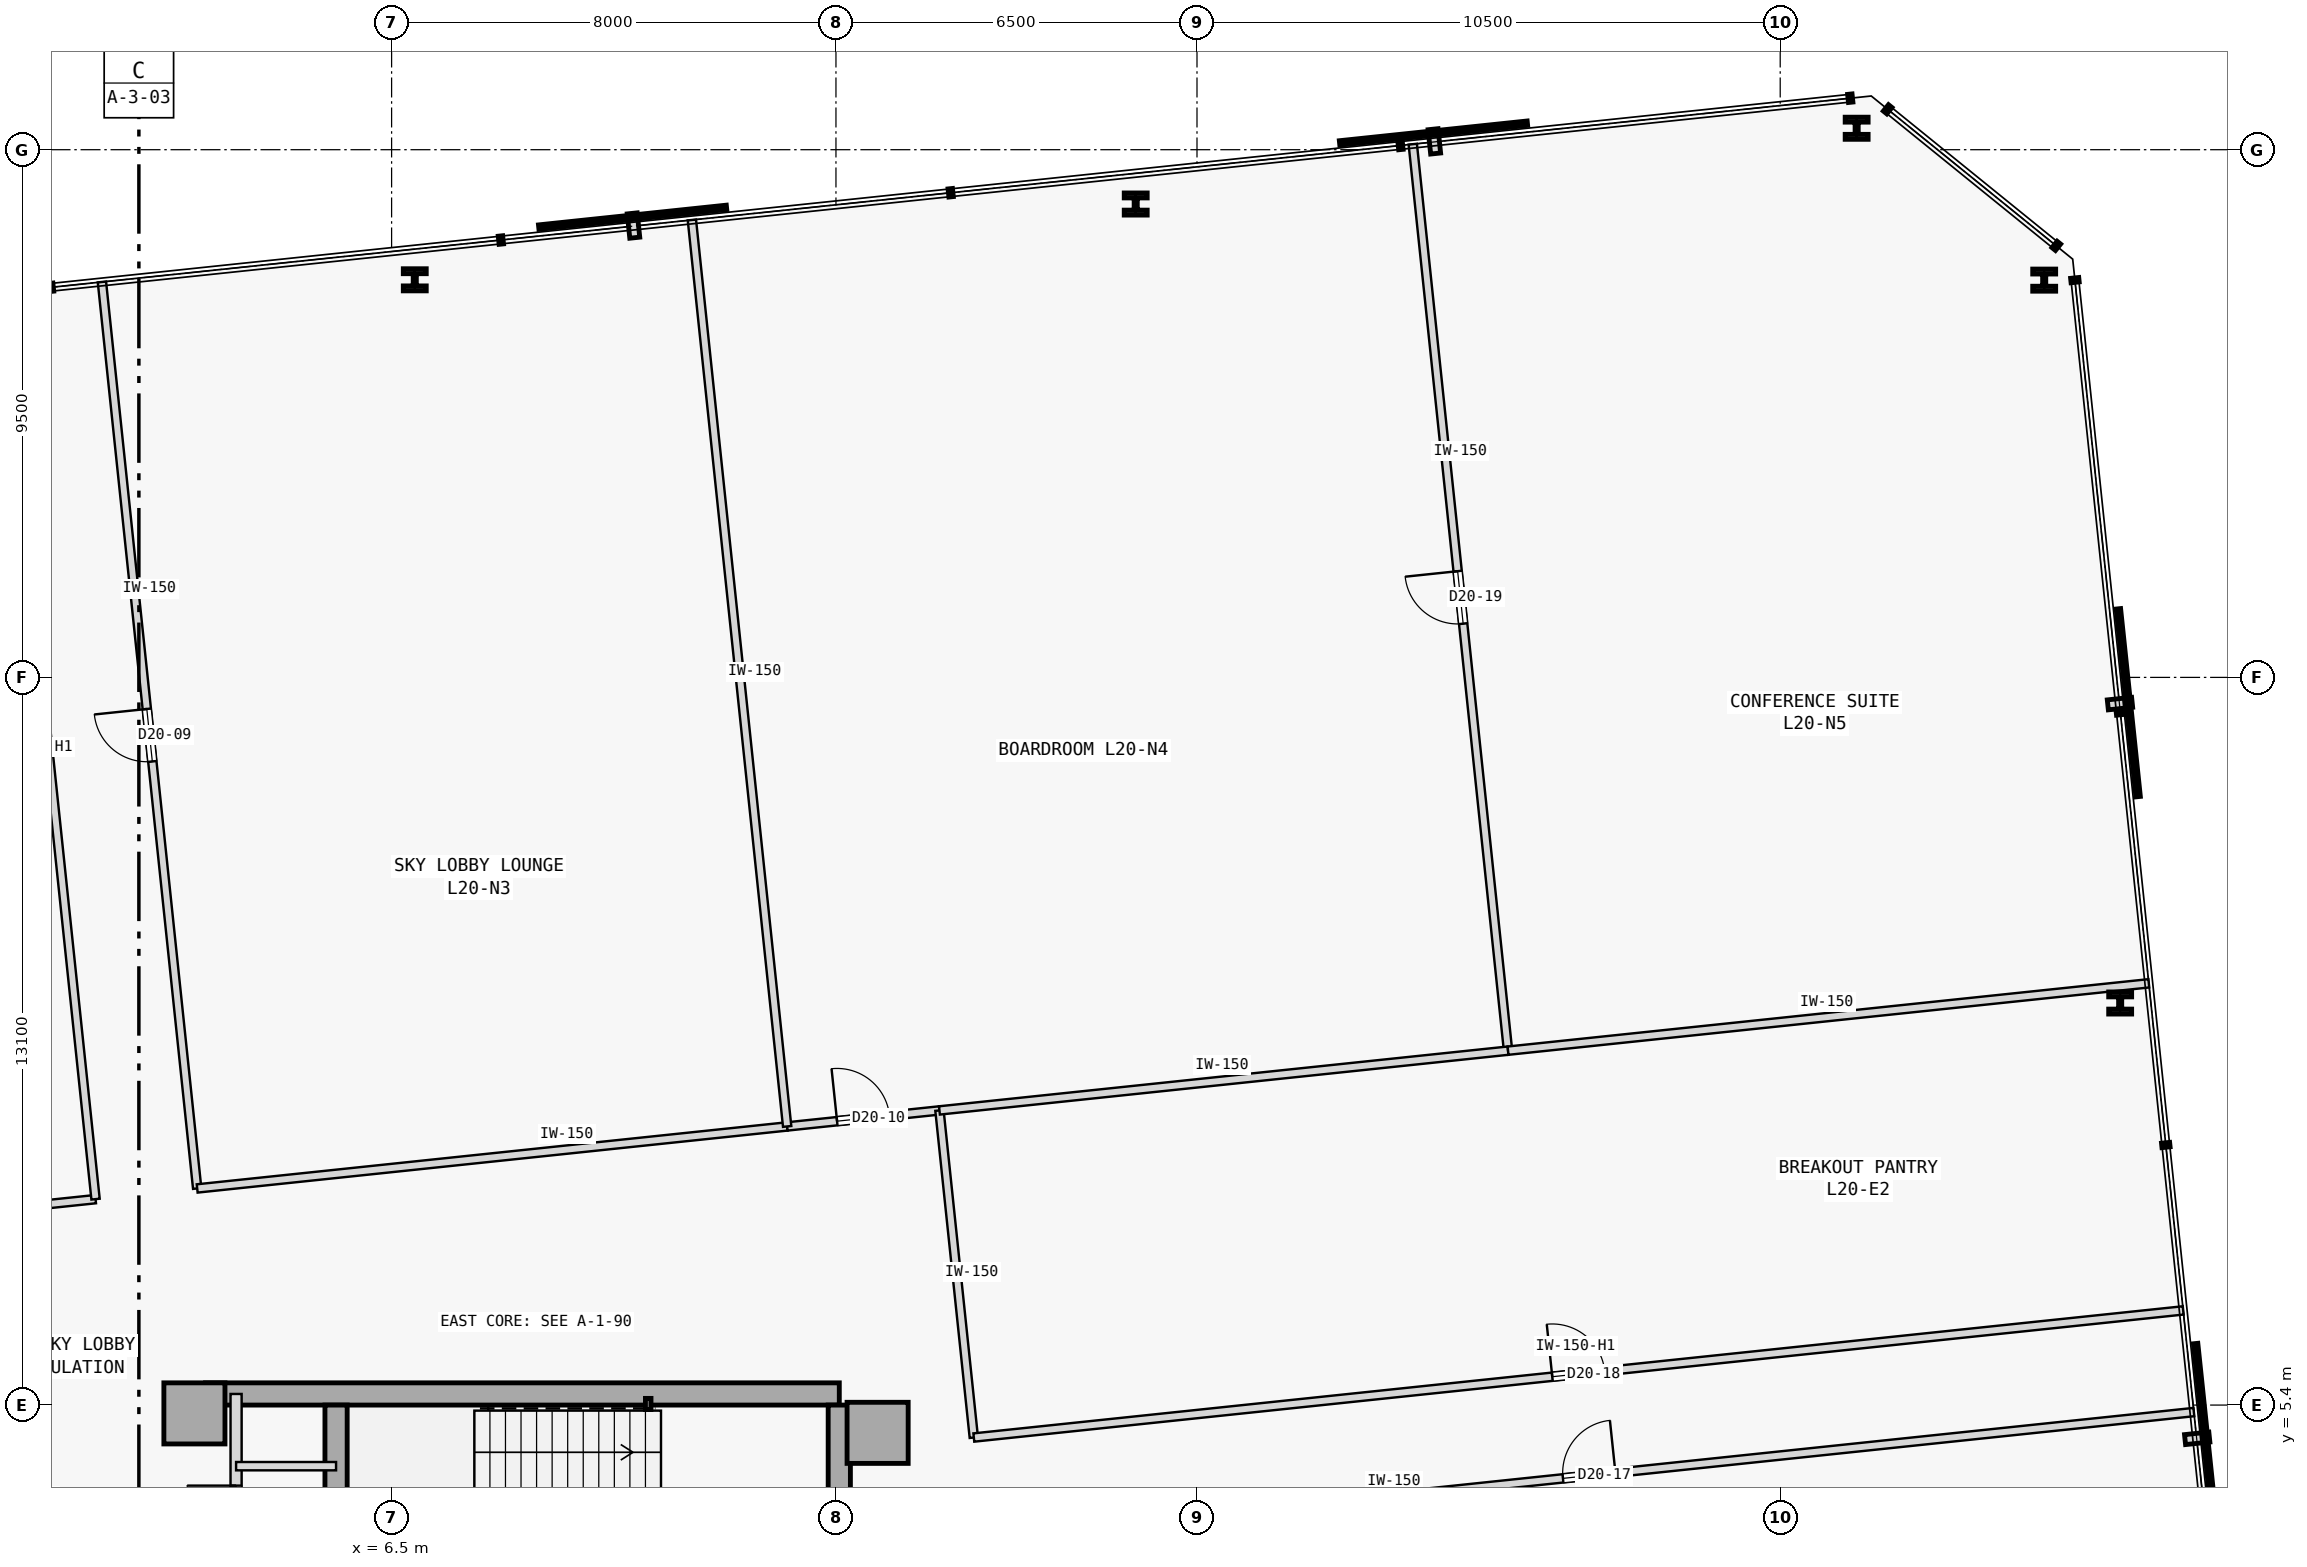
"""IFC4 building model, lengths in metres.
Left out: names, types, materials, properties, quantities, classifications, styles, units other than length and angle.
Written with IfcOpenShell. Run it as: python <this file> out.ifc"""

import sys

from ifc_helpers import new_model, si_unit, direction, frame, frame_2d, origin, origin_2d, place, context, subcontext, project, spatial, rectangle, hollow_rectangle, i_section, extrude, element, fill, save


model = new_model("IFC4")
c1 = context("Model", 3, precision=1e-05, world=origin(), true_north=direction((0.0, 1.0)))
c2 = subcontext(c1, "Body", "Model", "MODEL_VIEW")
j1 = project(units=[si_unit("LENGTHUNIT", "METRE"), si_unit("PLANEANGLEUNIT", "RADIAN")], contexts=[c1])
p1 = place(None, origin())
s1 = spatial("IfcSite", under=j1, at=p1, CompositionType="ELEMENT")
p2 = place(p1, origin())
s2 = spatial("IfcBuilding", under=s1, at=p2, CompositionType="ELEMENT")
p3 = place(p2, frame((0.0, 0.0, 83.2)))
s3 = spatial("IfcBuildingStorey", under=s2, at=p3, CompositionType="ELEMENT", Elevation=83.2)
for number, where, z_axis, x_axis in (
    (1, (15.25, 4.9, 0.0), (0.0, 0.0, 1.0), (1.0, 0.0, 0.0)),
    (2, (2.95, 5.25, 0.0), (0.0, 0.0, 1.0), (1.0, 0.0, 0.0)),
):
    element("IfcColumn", number, at=place(p3, frame(where, z_axis=z_axis, x_axis=x_axis)), inside=s3, PredefinedType="COLUMN", context=c2, shape_type="SweptSolid", body=[
        extrude(rectangle(XDim=1.1, YDim=1.1, at=origin_2d()), origin(), (0.0, 0.0, 1.0), 4.2),
    ])
p4 = place(p3, frame((3.15, 5.6, 0.0), z_axis=(0.0, 0.0, 1.0), x_axis=(1.0, 0.0, 0.0)))
e3 = element("IfcWall", 3, at=p4, inside=s3, PredefinedType="SHEAR", context=c2, shape_type="SweptSolid", body=[
    extrude(rectangle(XDim=11.41, YDim=0.4, at=frame_2d((5.705, 0.0))), origin(), (0.0, 0.0, 1.0), 3.975),
])
p5 = place(p3, frame((14.56, -5.4, 0.0), z_axis=(0.0, 0.0, 1.0), x_axis=(0.0, 1.0, 0.0)))
e4 = element("IfcWall", 4, at=p5, inside=s3, PredefinedType="SHEAR", context=c2, shape_type="SweptSolid", body=[
    extrude(rectangle(XDim=10.8, YDim=0.4, at=frame_2d((5.4, 0.0))), origin(), (0.0, 0.0, 1.0), 3.975),
])
p6 = place(p3, frame((5.5, 2.15, 0.0), z_axis=(0.0, 0.0, 1.0), x_axis=(0.0, 1.0, 0.0)))
e5 = element("IfcWall", 5, at=p6, inside=s3, PredefinedType="SHEAR", context=c2, shape_type="SweptSolid", body=[
    extrude(rectangle(XDim=3.25, YDim=0.4, at=frame_2d((1.625, 0.0))), origin(), (0.0, 0.0, 1.0), 3.975),
])
p7 = place(p3, frame((11.12, 5.42, 0.0), z_axis=(0.0, 0.0, 1.0), x_axis=(1.0, 0.0, 0.0)))
e6 = element("IfcColumn", 6, at=p7, inside=s3, PredefinedType="COLUMN", context=c2, shape_type="SweptSolid", body=[
    extrude(hollow_rectangle(XDim=0.1, YDim=0.2, WallThickness=0.008, at=origin_2d()), origin(), (0.0, 0.0, 1.0), 4.2),
])
for number, where, z_axis, x_axis in (
    (7, (37.621, 12.638, 0.0), (0.0, 0.0, 1.0), (1.0, 0.0, 0.0)),
    (8, (36.253, 25.652, 0.0), (0.0, 0.0, 1.0), (1.0, 0.0, 0.0)),
    (9, (32.876, 28.386, 0.0), (0.0, 0.0, 1.0), (1.0, 0.0, 0.0)),
    (10, (19.897, 27.022, 0.0), (0.0, 0.0, 1.0), (1.0, 0.0, 0.0)),
    (11, (6.917, 25.658, 0.0), (0.0, 0.0, 1.0), (1.0, 0.0, 0.0)),
):
    element("IfcColumn", number, at=place(p3, frame(where, z_axis=z_axis, x_axis=x_axis)), inside=s3, PredefinedType="COLUMN", context=c2, shape_type="SweptSolid", body=[
        extrude(i_section(OverallWidth=0.413, OverallDepth=0.398, WebThickness=0.056, FlangeThickness=0.089, FilletRadius=0.015, at=origin_2d()), origin(), (0.0, 0.0, 1.0), 4.2),
    ])
p8 = place(p3, frame((3.7, -1.15, 0.0), z_axis=(0.0, 0.0, 1.0), x_axis=(0.0, 1.0, 0.0)))
e12 = element("IfcWall", 12, at=p8, inside=s3, PredefinedType="STANDARD", context=c2, shape_type="SweptSolid", body=[
    extrude(rectangle(XDim=6.75, YDim=0.2, at=frame_2d((3.375, 0.0))), origin(), (0.0, 0.0, 1.0), 3.975),
])
p9 = place(p8, frame((0.35, 0.0, 0.0)))
e13 = element("IfcOpeningElement", 13, at=p9, cuts=e12, PredefinedType="OPENING", context=c2, shape_type="SweptSolid", body=[
    extrude(rectangle(XDim=0.88, YDim=2.15, at=frame_2d((0.44, 1.075))), frame((0.0, 0.11, 0.0), z_axis=(0.0, -1.0, 0.0), x_axis=(1.0, 0.0, 0.0)), (0.0, 0.0, 1.0), 0.22),
])
p10 = place(p8, frame((2.55, 0.0, 0.0)))
e14 = element("IfcOpeningElement", 14, at=p10, cuts=e12, PredefinedType="OPENING", context=c2, shape_type="SweptSolid", body=[
    extrude(rectangle(XDim=0.92, YDim=2.15, at=frame_2d((0.46, 1.075))), frame((0.0, 0.11, 0.0), z_axis=(0.0, -1.0, 0.0), x_axis=(1.0, 0.0, 0.0)), (0.0, 0.0, 1.0), 0.22),
])
p11 = place(p8, frame((4.22, 0.0, 0.0)))
e15 = element("IfcOpeningElement", 15, at=p11, cuts=e12, PredefinedType="OPENING", context=c2, shape_type="SweptSolid", body=[
    extrude(rectangle(XDim=0.88, YDim=2.15, at=frame_2d((0.44, 1.075))), frame((0.0, 0.11, 0.0), z_axis=(0.0, -1.0, 0.0), x_axis=(1.0, 0.0, 0.0)), (0.0, 0.0, 1.0), 0.22),
])
p12 = place(p3, frame((3.7, 4.3, 0.0), z_axis=(0.0, 0.0, 1.0), x_axis=(1.0, 0.0, 0.0)))
e16 = element("IfcWall", 16, at=p12, inside=s3, PredefinedType="PARTITIONING", context=c2, shape_type="SweptSolid", body=[
    extrude(rectangle(XDim=1.8, YDim=0.15, at=frame_2d((0.9, 0.0))), origin(), (0.0, 0.0, 1.0), 3.975),
])
p13 = place(p3, frame((-16.662, 7.233, 0.0), z_axis=(0.0, 0.0, 1.0), x_axis=(0.994521482375, 0.10453239256, 0.0)))
e17 = element("IfcWall", 17, at=p13, inside=s3, PredefinedType="PARTITIONING", context=c2, shape_type="SweptSolid", body=[
    extrude(rectangle(XDim=17.93, YDim=0.15, at=frame_2d((8.965, 0.0))), origin(), (0.0, 0.0, 1.0), 3.975),
])
p14 = place(p13, frame((8.49, 0.0, 0.0)))
e18 = element("IfcOpeningElement", 18, at=p14, cuts=e17, PredefinedType="OPENING", context=c2, shape_type="SweptSolid", body=[
    extrude(rectangle(XDim=0.95, YDim=2.15, at=frame_2d((0.475, 1.075))), frame((0.0, 0.085, 0.0), z_axis=(0.0, -1.0, 0.0), x_axis=(1.0, 0.0, 0.0)), (0.0, 0.0, 1.0), 0.17),
])
p15 = place(p3, frame((1.17, 9.107, 0.0), z_axis=(0.0, 0.0, 1.0), x_axis=(-0.104521364336, 0.99452264147, 0.0)))
e19 = element("IfcWall", 19, at=p15, inside=s3, PredefinedType="PARTITIONING", context=c2, shape_type="SweptSolid", body=[
    extrude(rectangle(XDim=16.409, YDim=0.15, at=frame_2d((8.205, 0.0))), origin(), (0.0, 0.0, 1.0), 3.525),
])
p16 = place(p3, frame((3.0, 9.3, 0.0), z_axis=(0.0, 0.0, 1.0), x_axis=(-0.104536080245, 0.994521094762, 0.0)))
e20 = element("IfcWall", 20, at=p16, inside=s3, PredefinedType="PARTITIONING", context=c2, shape_type="SweptSolid", body=[
    extrude(rectangle(XDim=16.409, YDim=0.15, at=frame_2d((8.205, 0.0))), origin(), (0.0, 0.0, 1.0), 3.975),
])
p17 = place(p16, frame((7.729, 0.0, 0.0)))
e21 = element("IfcOpeningElement", 21, at=p17, cuts=e20, PredefinedType="OPENING", context=c2, shape_type="SweptSolid", body=[
    extrude(rectangle(XDim=0.95, YDim=2.15, at=frame_2d((0.475, 1.075))), frame((0.0, 0.085, 0.0), z_axis=(0.0, -1.0, 0.0), x_axis=(1.0, 0.0, 0.0)), (0.0, 0.0, 1.0), 0.17),
])
p18 = place(p3, frame((3.0, 9.3, 0.0), z_axis=(0.0, 0.0, 1.0), x_axis=(0.994523225506, 0.10451580708, 0.0)))
e22 = element("IfcWall", 22, at=p18, inside=s3, PredefinedType="PARTITIONING", context=c2, shape_type="SweptSolid", body=[
    extrude(rectangle(XDim=10.68, YDim=0.15, at=frame_2d((5.34, 0.0))), origin(), (0.0, 0.0, 1.0), 3.975),
])
p19 = place(p3, frame((13.621, 10.416, 0.0), z_axis=(0.0, 0.0, 1.0), x_axis=(0.994525813133, 0.104491181506, 0.0)))
e23 = element("IfcWall", 23, at=p19, inside=s3, PredefinedType="PARTITIONING", context=c2, shape_type="SweptSolid", body=[
    extrude(rectangle(XDim=2.757, YDim=0.15, at=frame_2d((1.378, 0.0))), origin(), (0.0, 0.0, 1.0), 3.975),
])
p20 = place(p19, frame((0.904, 0.0, 0.0)))
e24 = element("IfcOpeningElement", 24, at=p20, cuts=e23, PredefinedType="OPENING", context=c2, shape_type="SweptSolid", body=[
    extrude(rectangle(XDim=0.95, YDim=2.15, at=frame_2d((0.475, 1.075))), frame((0.0, 0.085, 0.0), z_axis=(0.0, -1.0, 0.0), x_axis=(1.0, 0.0, 0.0)), (0.0, 0.0, 1.0), 0.17),
])
p21 = place(p3, frame((17.175, 2.986, 0.0), z_axis=(0.0, 0.0, 1.0), x_axis=(0.994522365919, 0.104523986183, 0.0)))
e25 = element("IfcWall", 25, at=p21, inside=s3, PredefinedType="PARTITIONING", context=c2, shape_type="SweptSolid", body=[
    extrude(rectangle(XDim=21.893, YDim=0.15, at=frame_2d((10.946, 0.0))), origin(), (0.0, 0.0, 1.0), 3.975),
])
p22 = place(p21, frame((10.471, 0.0, 0.0)))
e26 = element("IfcOpeningElement", 26, at=p22, cuts=e25, PredefinedType="OPENING", context=c2, shape_type="SweptSolid", body=[
    extrude(rectangle(XDim=0.95, YDim=2.15, at=frame_2d((0.475, 1.075))), frame((0.0, 0.085, 0.0), z_axis=(0.0, -1.0, 0.0), x_axis=(1.0, 0.0, 0.0)), (0.0, 0.0, 1.0), 0.17),
])
p23 = place(p3, frame((16.982, 4.816, 0.0), z_axis=(0.0, 0.0, 1.0), x_axis=(-0.104528094162, 0.994521934163, 0.0)))
e27 = element("IfcWall", 27, at=p23, inside=s3, PredefinedType="PARTITIONING", context=c2, shape_type="SweptSolid", body=[
    extrude(rectangle(XDim=5.921, YDim=0.15, at=frame_2d((2.96, 0.0))), origin(), (0.0, 0.0, 1.0), 3.975),
])
p24 = place(p3, frame((16.982, 4.816, 0.0), z_axis=(0.0, 0.0, 1.0), x_axis=(0.994522487751, 0.10452282697, 0.0)))
e28 = element("IfcWall", 28, at=p24, inside=s3, PredefinedType="PARTITIONING", context=c2, shape_type="SweptSolid", body=[
    extrude(rectangle(XDim=21.893, YDim=0.15, at=frame_2d((10.947, 0.0))), origin(), (0.0, 0.0, 1.0), 3.525),
])
p25 = place(p24, frame((10.471, 0.0, 0.0)))
e29 = element("IfcOpeningElement", 29, at=p25, cuts=e28, PredefinedType="OPENING", context=c2, shape_type="SweptSolid", body=[
    extrude(rectangle(XDim=0.95, YDim=2.15, at=frame_2d((0.475, 1.075))), frame((0.0, 0.085, 0.0), z_axis=(0.0, -1.0, 0.0), x_axis=(1.0, 0.0, 0.0)), (0.0, 0.0, 1.0), 0.17),
])
p26 = place(p3, frame((13.621, 10.416, 0.0), z_axis=(0.0, 0.0, 1.0), x_axis=(-0.104521364336, 0.99452264147, 0.0)))
e30 = element("IfcWall", 30, at=p26, inside=s3, PredefinedType="PARTITIONING", context=c2, shape_type="SweptSolid", body=[
    extrude(rectangle(XDim=16.409, YDim=0.15, at=frame_2d((8.205, 0.0))), origin(), (0.0, 0.0, 1.0), 3.975),
])
p27 = place(p3, frame((26.6, 11.78, 0.0), z_axis=(0.0, 0.0, 1.0), x_axis=(-0.104521364336, 0.99452264147, 0.0)))
e31 = element("IfcWall", 31, at=p27, inside=s3, PredefinedType="PARTITIONING", context=c2, shape_type="SweptSolid", body=[
    extrude(rectangle(XDim=16.409, YDim=0.15, at=frame_2d((8.205, 0.0))), origin(), (0.0, 0.0, 1.0), 3.975),
])
p28 = place(p27, frame((7.729, 0.0, 0.0)))
e32 = element("IfcOpeningElement", 32, at=p28, cuts=e31, PredefinedType="OPENING", context=c2, shape_type="SweptSolid", body=[
    extrude(rectangle(XDim=0.95, YDim=2.15, at=frame_2d((0.475, 1.075))), frame((0.0, 0.085, 0.0), z_axis=(0.0, -1.0, 0.0), x_axis=(1.0, 0.0, 0.0)), (0.0, 0.0, 1.0), 0.17),
])
p29 = place(p3, frame((16.363, 10.704, 0.0), z_axis=(0.0, 0.0, 1.0), x_axis=(0.994519220898, 0.104553906025, 0.0)))
e33 = element("IfcWall", 33, at=p29, inside=s3, PredefinedType="PARTITIONING", context=c2, shape_type="SweptSolid", body=[
    extrude(rectangle(XDim=10.293, YDim=0.15, at=frame_2d((5.146, 0.0))), origin(), (0.0, 0.0, 1.0), 3.975),
])
p30 = place(p3, frame((26.6, 11.78, 0.0), z_axis=(0.0, 0.0, 1.0), x_axis=(0.994522968342, 0.104518254096, 0.0)))
e34 = element("IfcWall", 34, at=p30, inside=s3, PredefinedType="PARTITIONING", context=c2, shape_type="SweptSolid", body=[
    extrude(rectangle(XDim=11.6, YDim=0.15, at=frame_2d((5.8, 0.0))), origin(), (0.0, 0.0, 1.0), 3.975),
])
p31 = place(p11, origin())
e35 = element("IfcDoor", 35, at=p31, inside=s3, OperationType="SINGLE_SWING_RIGHT", PredefinedType="DOOR", context=c2, shape_type="SweptSolid", body=[
    extrude(rectangle(XDim=0.88, YDim=2.15, at=frame_2d((0.44, 1.075))), frame((0.0, 0.025, 0.0), z_axis=(0.0, -1.0, 0.0), x_axis=(1.0, 0.0, 0.0)), (0.0, 0.0, 1.0), 0.05),
])
fill(e15, e35)
p32 = place(p17, origin())
e36 = element("IfcDoor", 36, at=p32, inside=s3, OperationType="SINGLE_SWING_RIGHT", PredefinedType="DOOR", context=c2, shape_type="SweptSolid", body=[
    extrude(rectangle(XDim=0.95, YDim=2.15, at=frame_2d((0.475, 1.075))), frame((0.0, 0.025, 0.0), z_axis=(0.0, -1.0, 0.0), x_axis=(1.0, 0.0, 0.0)), (0.0, 0.0, 1.0), 0.05),
])
fill(e21, e36)
p33 = place(p20, origin())
e37 = element("IfcDoor", 37, at=p33, inside=s3, OperationType="SINGLE_SWING_LEFT", PredefinedType="DOOR", context=c2, shape_type="SweptSolid", body=[
    extrude(rectangle(XDim=0.95, YDim=2.15, at=frame_2d((0.475, 1.075))), frame((0.0, 0.025, 0.0), z_axis=(0.0, -1.0, 0.0), x_axis=(1.0, 0.0, 0.0)), (0.0, 0.0, 1.0), 0.05),
])
fill(e24, e37)
p34 = place(p22, origin())
e38 = element("IfcDoor", 38, at=p34, inside=s3, OperationType="SINGLE_SWING_RIGHT", PredefinedType="DOOR", context=c2, shape_type="SweptSolid", body=[
    extrude(rectangle(XDim=0.95, YDim=2.15, at=frame_2d((0.475, 1.075))), frame((0.0, 0.025, 0.0), z_axis=(0.0, -1.0, 0.0), x_axis=(1.0, 0.0, 0.0)), (0.0, 0.0, 1.0), 0.05),
])
fill(e26, e38)
p35 = place(p25, origin())
e39 = element("IfcDoor", 39, at=p35, inside=s3, OperationType="SINGLE_SWING_LEFT", PredefinedType="DOOR", context=c2, shape_type="SweptSolid", body=[
    extrude(rectangle(XDim=0.95, YDim=2.15, at=frame_2d((0.475, 1.075))), frame((0.0, 0.025, 0.0), z_axis=(0.0, -1.0, 0.0), x_axis=(1.0, 0.0, 0.0)), (0.0, 0.0, 1.0), 0.05),
])
fill(e29, e39)
p36 = place(p28, origin())
e40 = element("IfcDoor", 40, at=p36, inside=s3, OperationType="SINGLE_SWING_RIGHT", PredefinedType="DOOR", context=c2, shape_type="SweptSolid", body=[
    extrude(rectangle(XDim=0.95, YDim=2.15, at=frame_2d((0.475, 1.075))), frame((0.0, 0.025, 0.0), z_axis=(0.0, -1.0, 0.0), x_axis=(1.0, 0.0, 0.0)), (0.0, 0.0, 1.0), 0.05),
])
fill(e32, e40)
save(model, sys.argv[1])
